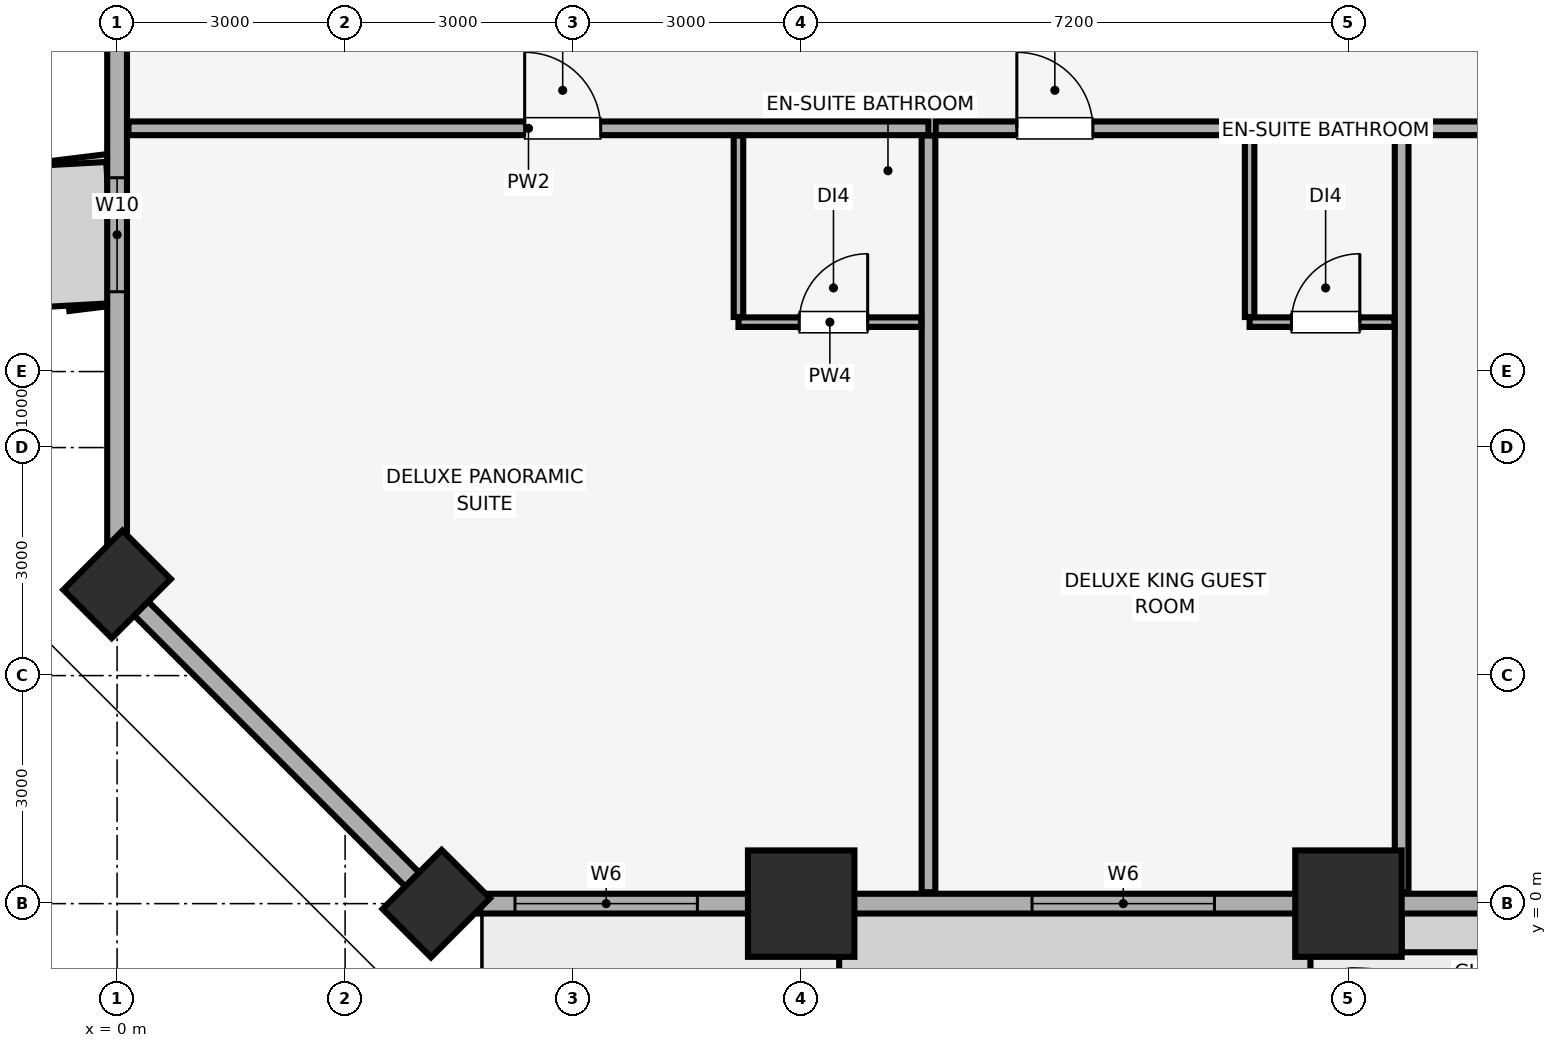
"""IFC4 building model, lengths in metres.
Left out: names, types, materials, properties, quantities, classifications, styles, units other than length and angle.
Written with IfcOpenShell. Run it as: python <this file> out.ifc"""

import sys

from ifc_helpers import new_model, si_unit, direction, frame, frame_2d, origin, origin_2d, place, context, subcontext, project, spatial, rectangle, extrude, element, fill, save


model = new_model("IFC4")
c1 = context("Model", 3, precision=1e-05, world=origin(), true_north=direction((0.0, 1.0)))
c2 = subcontext(c1, "Body", "Model", "MODEL_VIEW")
j1 = project(units=[si_unit("LENGTHUNIT", "METRE"), si_unit("PLANEANGLEUNIT", "RADIAN")], contexts=[c1])
p1 = place(None, origin())
s1 = spatial("IfcSite", under=j1, at=p1, CompositionType="ELEMENT")
p2 = place(p1, origin())
s2 = spatial("IfcBuilding", under=s1, at=p2, CompositionType="ELEMENT")
p3 = place(p2, frame((0.0, 0.0, 46.4)))
s3 = spatial("IfcBuildingStorey", under=s2, at=p3, CompositionType="ELEMENT", Elevation=46.4)
for number, where, z_axis, x_axis in (
    (1, (9.0, 0.0, 0.0), (0.0, 0.0, 1.0), (1.0, 0.0, 0.0)),
    (2, (16.2, 0.0, 0.0), (0.0, 0.0, 1.0), (1.0, 0.0, 0.0)),
):
    element("IfcColumn", number, at=place(p3, frame(where, z_axis=z_axis, x_axis=x_axis)), inside=s3, PredefinedType="COLUMN", context=c2, shape_type="SweptSolid", body=[
        extrude(rectangle(XDim=1.4, YDim=1.4, at=origin_2d()), origin(), (0.0, 0.0, 1.0), 3.51),
    ])
for number, where, z_axis, x_axis in (
    (3, (4.2, 0.0, 0.0), (0.0, 0.0, 1.0), (0.707, 0.707, 0.0)),
    (4, (0.0, 4.2, 0.0), (0.0, 0.0, 1.0), (0.707, 0.707, 0.0)),
):
    element("IfcColumn", number, at=place(p3, frame(where, z_axis=z_axis, x_axis=x_axis)), inside=s3, PredefinedType="PILASTER", context=c2, shape_type="SweptSolid", body=[
        extrude(rectangle(XDim=1.1, YDim=0.9, at=origin_2d()), origin(), (0.0, 0.0, 1.0), 3.51),
    ])
p4 = place(p3, frame((4.2, 0.0, 0.0), z_axis=(0.0, 0.0, 1.0), x_axis=(1.0, 0.0, 0.0)))
e5 = element("IfcWall", 5, at=p4, inside=s3, PredefinedType="SOLIDWALL", context=c2, shape_type="SweptSolid", body=[
    extrude(rectangle(XDim=75.6, YDim=0.26, at=frame_2d((37.8, 0.0))), origin(), (0.0, 0.0, 1.0), 2.56),
])
p5 = place(p4, frame((22.948, 0.0, 0.0)))
e6 = element("IfcOpeningElement", 6, at=p5, cuts=e5, PredefinedType="OPENING", context=c2, shape_type="SweptSolid", body=[
    extrude(rectangle(XDim=1.1, YDim=2.15, at=frame_2d((0.55, 1.075))), frame((0.0, 0.14, 0.0), z_axis=(0.0, -1.0, 0.0), x_axis=(1.0, 0.0, 0.0)), (0.0, 0.0, 1.0), 0.28),
])
p6 = place(p4, frame((44.61, 0.0, 0.0)))
e7 = element("IfcOpeningElement", 7, at=p6, cuts=e5, PredefinedType="OPENING", context=c2, shape_type="SweptSolid", body=[
    extrude(rectangle(XDim=1.1, YDim=2.15, at=frame_2d((0.55, 1.075))), frame((0.0, 0.14, 0.0), z_axis=(0.0, -1.0, 0.0), x_axis=(1.0, 0.0, 0.0)), (0.0, 0.0, 1.0), 0.28),
])
p7 = place(p4, frame((66.272, 0.0, 0.0)))
e8 = element("IfcOpeningElement", 8, at=p7, cuts=e5, PredefinedType="OPENING", context=c2, shape_type="SweptSolid", body=[
    extrude(rectangle(XDim=1.1, YDim=2.15, at=frame_2d((0.55, 1.075))), frame((0.0, 0.14, 0.0), z_axis=(0.0, -1.0, 0.0), x_axis=(1.0, 0.0, 0.0)), (0.0, 0.0, 1.0), 0.28),
])
p8 = place(p4, frame((1.035, 0.0, 0.85)))
e9 = element("IfcOpeningElement", 9, at=p8, cuts=e5, PredefinedType="OPENING", context=c2, shape_type="SweptSolid", body=[
    extrude(rectangle(XDim=2.4, YDim=1.5, at=frame_2d((1.2, 0.75))), frame((0.0, 0.14, 0.0), z_axis=(0.0, -1.0, 0.0), x_axis=(1.0, 0.0, 0.0)), (0.0, 0.0, 1.0), 0.28),
])
p9 = place(p4, frame((7.837, 0.0, 0.85)))
e10 = element("IfcOpeningElement", 10, at=p9, cuts=e5, PredefinedType="OPENING", context=c2, shape_type="SweptSolid", body=[
    extrude(rectangle(XDim=2.4, YDim=1.5, at=frame_2d((1.2, 0.75))), frame((0.0, 0.14, 0.0), z_axis=(0.0, -1.0, 0.0), x_axis=(1.0, 0.0, 0.0)), (0.0, 0.0, 1.0), 0.28),
])
p10 = place(p4, frame((14.55, 0.0, 0.85)))
e11 = element("IfcOpeningElement", 11, at=p10, cuts=e5, PredefinedType="OPENING", context=c2, shape_type="SweptSolid", body=[
    extrude(rectangle(XDim=2.4, YDim=1.5, at=frame_2d((1.2, 0.75))), frame((0.0, 0.14, 0.0), z_axis=(0.0, -1.0, 0.0), x_axis=(1.0, 0.0, 0.0)), (0.0, 0.0, 1.0), 0.28),
])
p11 = place(p4, frame((20.439, 0.0, 0.85)))
e12 = element("IfcOpeningElement", 12, at=p11, cuts=e5, PredefinedType="OPENING", context=c2, shape_type="SweptSolid", body=[
    extrude(rectangle(XDim=1.5, YDim=1.4, at=frame_2d((0.75, 0.7))), frame((0.0, 0.14, 0.0), z_axis=(0.0, -1.0, 0.0), x_axis=(1.0, 0.0, 0.0)), (0.0, 0.0, 1.0), 0.28),
])
p12 = place(p4, frame((27.887, 0.0, 0.85)))
e13 = element("IfcOpeningElement", 13, at=p12, cuts=e5, PredefinedType="OPENING", context=c2, shape_type="SweptSolid", body=[
    extrude(rectangle(XDim=2.4, YDim=1.5, at=frame_2d((1.2, 0.75))), frame((0.0, 0.14, 0.0), z_axis=(0.0, -1.0, 0.0), x_axis=(1.0, 0.0, 0.0)), (0.0, 0.0, 1.0), 0.28),
])
p13 = place(p4, frame((34.6, 0.0, 0.85)))
e14 = element("IfcOpeningElement", 14, at=p13, cuts=e5, PredefinedType="OPENING", context=c2, shape_type="SweptSolid", body=[
    extrude(rectangle(XDim=2.4, YDim=1.5, at=frame_2d((1.2, 0.75))), frame((0.0, 0.14, 0.0), z_axis=(0.0, -1.0, 0.0), x_axis=(1.0, 0.0, 0.0)), (0.0, 0.0, 1.0), 0.28),
])
p14 = place(p4, frame((38.399, 0.0, 0.85)))
e15 = element("IfcOpeningElement", 15, at=p14, cuts=e5, PredefinedType="OPENING", context=c2, shape_type="SweptSolid", body=[
    extrude(rectangle(XDim=2.4, YDim=1.5, at=frame_2d((1.2, 0.75))), frame((0.0, 0.14, 0.0), z_axis=(0.0, -1.0, 0.0), x_axis=(1.0, 0.0, 0.0)), (0.0, 0.0, 1.0), 0.28),
])
p15 = place(p4, frame((46.59, 0.0, 0.85)))
e16 = element("IfcOpeningElement", 16, at=p15, cuts=e5, PredefinedType="OPENING", context=c2, shape_type="SweptSolid", body=[
    extrude(rectangle(XDim=1.5, YDim=1.4, at=frame_2d((0.75, 0.7))), frame((0.0, 0.14, 0.0), z_axis=(0.0, -1.0, 0.0), x_axis=(1.0, 0.0, 0.0)), (0.0, 0.0, 1.0), 0.28),
])
p16 = place(p4, frame((51.824, 0.0, 0.85)))
e17 = element("IfcOpeningElement", 17, at=p16, cuts=e5, PredefinedType="OPENING", context=c2, shape_type="SweptSolid", body=[
    extrude(rectangle(XDim=2.4, YDim=1.5, at=frame_2d((1.2, 0.75))), frame((0.0, 0.14, 0.0), z_axis=(0.0, -1.0, 0.0), x_axis=(1.0, 0.0, 0.0)), (0.0, 0.0, 1.0), 0.28),
])
p17 = place(p4, frame((58.449, 0.0, 0.85)))
e18 = element("IfcOpeningElement", 18, at=p17, cuts=e5, PredefinedType="OPENING", context=c2, shape_type="SweptSolid", body=[
    extrude(rectangle(XDim=2.4, YDim=1.5, at=frame_2d((1.2, 0.75))), frame((0.0, 0.14, 0.0), z_axis=(0.0, -1.0, 0.0), x_axis=(1.0, 0.0, 0.0)), (0.0, 0.0, 1.0), 0.28),
])
p18 = place(p4, frame((72.165, 0.0, 0.85)))
e19 = element("IfcOpeningElement", 19, at=p18, cuts=e5, PredefinedType="OPENING", context=c2, shape_type="SweptSolid", body=[
    extrude(rectangle(XDim=2.4, YDim=1.5, at=frame_2d((1.2, 0.75))), frame((0.0, 0.14, 0.0), z_axis=(0.0, -1.0, 0.0), x_axis=(1.0, 0.0, 0.0)), (0.0, 0.0, 1.0), 0.28),
])
p19 = place(p3, frame((0.0, 44.8, 0.0), z_axis=(0.0, 0.0, 1.0), x_axis=(0.0, -1.0, 0.0)))
e20 = element("IfcWall", 20, at=p19, inside=s3, PredefinedType="SOLIDWALL", context=c2, shape_type="SweptSolid", body=[
    extrude(rectangle(XDim=40.6, YDim=0.26, at=frame_2d((20.3, 0.0))), origin(), (0.0, 0.0, 1.0), 2.56),
])
p20 = place(p19, frame((35.25, 0.0, 0.85)))
e21 = element("IfcOpeningElement", 21, at=p20, cuts=e20, PredefinedType="OPENING", context=c2, shape_type="SweptSolid", body=[
    extrude(rectangle(XDim=1.5, YDim=1.4, at=frame_2d((0.75, 0.7))), frame((0.0, 0.14, 0.0), z_axis=(0.0, -1.0, 0.0), x_axis=(1.0, 0.0, 0.0)), (0.0, 0.0, 1.0), 0.28),
])
p21 = place(p19, frame((25.985, 0.0, 0.85)))
e22 = element("IfcOpeningElement", 22, at=p21, cuts=e20, PredefinedType="OPENING", context=c2, shape_type="SweptSolid", body=[
    extrude(rectangle(XDim=1.5, YDim=1.4, at=frame_2d((0.75, 0.7))), frame((0.0, 0.14, 0.0), z_axis=(0.0, -1.0, 0.0), x_axis=(1.0, 0.0, 0.0)), (0.0, 0.0, 1.0), 0.28),
])
p22 = place(p19, frame((19.185, 0.0, 0.85)))
e23 = element("IfcOpeningElement", 23, at=p22, cuts=e20, PredefinedType="OPENING", context=c2, shape_type="SweptSolid", body=[
    extrude(rectangle(XDim=1.5, YDim=1.4, at=frame_2d((0.75, 0.7))), frame((0.0, 0.14, 0.0), z_axis=(0.0, -1.0, 0.0), x_axis=(1.0, 0.0, 0.0)), (0.0, 0.0, 1.0), 0.28),
])
p23 = place(p19, frame((10.4, 0.0, 0.85)))
e24 = element("IfcOpeningElement", 24, at=p23, cuts=e20, PredefinedType="OPENING", context=c2, shape_type="SweptSolid", body=[
    extrude(rectangle(XDim=1.5, YDim=1.4, at=frame_2d((0.75, 0.7))), frame((0.0, 0.14, 0.0), z_axis=(0.0, -1.0, 0.0), x_axis=(1.0, 0.0, 0.0)), (0.0, 0.0, 1.0), 0.28),
])
p24 = place(p19, frame((1.735, 0.0, 0.85)))
e25 = element("IfcOpeningElement", 25, at=p24, cuts=e20, PredefinedType="OPENING", context=c2, shape_type="SweptSolid", body=[
    extrude(rectangle(XDim=1.5, YDim=1.4, at=frame_2d((0.75, 0.7))), frame((0.0, 0.14, 0.0), z_axis=(0.0, -1.0, 0.0), x_axis=(1.0, 0.0, 0.0)), (0.0, 0.0, 1.0), 0.28),
])
p25 = place(p3, frame((0.0, 4.2, 0.0), z_axis=(0.0, 0.0, 1.0), x_axis=(0.707106781187, -0.707106781187, 0.0)))
e26 = element("IfcWall", 26, at=p25, inside=s3, PredefinedType="SOLIDWALL", context=c2, shape_type="SweptSolid", body=[
    extrude(rectangle(XDim=5.94, YDim=0.26, at=frame_2d((2.97, 0.0))), origin(), (0.0, 0.0, 1.0), 2.56),
])
p26 = place(p3, frame((0.15, 10.2, 0.0), z_axis=(0.0, 0.0, 1.0), x_axis=(1.0, 0.0, 0.0)))
e27 = element("IfcWall", 27, at=p26, inside=s3, PredefinedType="PARTITIONING", context=c2, shape_type="SweptSolid", body=[
    extrude(rectangle(XDim=10.525, YDim=0.18, at=frame_2d((5.262, 0.0))), origin(), (0.0, 0.0, 1.0), 3.51),
])
p27 = place(p26, frame((5.212, 0.0, 0.0)))
e28 = element("IfcOpeningElement", 28, at=p27, cuts=e27, PredefinedType="OPENING", context=c2, shape_type="SweptSolid", body=[
    extrude(rectangle(XDim=1.0, YDim=2.15, at=frame_2d((0.5, 1.075))), frame((0.0, 0.1, 0.0), z_axis=(0.0, -1.0, 0.0), x_axis=(1.0, 0.0, 0.0)), (0.0, 0.0, 1.0), 0.2),
])
p28 = place(p3, frame((10.675, 0.15, 0.0), z_axis=(0.0, 0.0, 1.0), x_axis=(0.0, 1.0, 0.0)))
e29 = element("IfcWall", 29, at=p28, inside=s3, PredefinedType="PARTITIONING", context=c2, shape_type="SweptSolid", body=[
    extrude(rectangle(XDim=9.955, YDim=0.18, at=frame_2d((4.978, 0.0))), origin(), (0.0, 0.0, 1.0), 3.51),
])
p29 = place(p3, frame((8.175, 7.65, 0.0), z_axis=(0.0, 0.0, 1.0), x_axis=(1.0, 0.0, 0.0)))
e30 = element("IfcWall", 30, at=p29, inside=s3, PredefinedType="PARTITIONING", context=c2, shape_type="SweptSolid", body=[
    extrude(rectangle(XDim=2.405, YDim=0.125, at=frame_2d((1.203, 0.0))), origin(), (0.0, 0.0, 1.0), 3.51),
])
p30 = place(p29, frame((0.8, 0.0, 0.0)))
e31 = element("IfcOpeningElement", 31, at=p30, cuts=e30, PredefinedType="OPENING", context=c2, shape_type="SweptSolid", body=[
    extrude(rectangle(XDim=0.9, YDim=2.1, at=frame_2d((0.45, 1.05))), frame((0.0, 0.073, 0.0), z_axis=(0.0, -1.0, 0.0), x_axis=(1.0, 0.0, 0.0)), (0.0, 0.0, 1.0), 0.145),
])
p31 = place(p3, frame((8.175, 7.718, 0.0), z_axis=(0.0, 0.0, 1.0), x_axis=(0.0, 1.0, 0.0)))
e32 = element("IfcWall", 32, at=p31, inside=s3, PredefinedType="PARTITIONING", context=c2, shape_type="SweptSolid", body=[
    extrude(rectangle(XDim=2.387, YDim=0.125, at=frame_2d((1.194, 0.0))), origin(), (0.0, 0.0, 1.0), 3.51),
])
p32 = place(p3, frame((10.77, 10.2, 0.0), z_axis=(0.0, 0.0, 1.0), x_axis=(1.0, 0.0, 0.0)))
e33 = element("IfcWall", 33, at=p32, inside=s3, PredefinedType="PARTITIONING", context=c2, shape_type="SweptSolid", body=[
    extrude(rectangle(XDim=6.13, YDim=0.18, at=frame_2d((3.065, 0.0))), origin(), (0.0, 0.0, 1.0), 3.51),
])
p33 = place(p32, frame((1.067, 0.0, 0.0)))
e34 = element("IfcOpeningElement", 34, at=p33, cuts=e33, PredefinedType="OPENING", context=c2, shape_type="SweptSolid", body=[
    extrude(rectangle(XDim=1.0, YDim=2.15, at=frame_2d((0.5, 1.075))), frame((0.0, 0.1, 0.0), z_axis=(0.0, -1.0, 0.0), x_axis=(1.0, 0.0, 0.0)), (0.0, 0.0, 1.0), 0.2),
])
p34 = place(p3, frame((16.9, 0.15, 0.0), z_axis=(0.0, 0.0, 1.0), x_axis=(0.0, 1.0, 0.0)))
e35 = element("IfcWall", 35, at=p34, inside=s3, PredefinedType="PARTITIONING", context=c2, shape_type="SweptSolid", body=[
    extrude(rectangle(XDim=9.955, YDim=0.18, at=frame_2d((4.978, 0.0))), origin(), (0.0, 0.0, 1.0), 3.51),
])
p35 = place(p3, frame((14.9, 7.65, 0.0), z_axis=(0.0, 0.0, 1.0), x_axis=(1.0, 0.0, 0.0)))
e36 = element("IfcWall", 36, at=p35, inside=s3, PredefinedType="PARTITIONING", context=c2, shape_type="SweptSolid", body=[
    extrude(rectangle(XDim=1.905, YDim=0.125, at=frame_2d((0.953, 0.0))), origin(), (0.0, 0.0, 1.0), 3.51),
])
p36 = place(p35, frame((0.55, 0.0, 0.0)))
e37 = element("IfcOpeningElement", 37, at=p36, cuts=e36, PredefinedType="OPENING", context=c2, shape_type="SweptSolid", body=[
    extrude(rectangle(XDim=0.9, YDim=2.1, at=frame_2d((0.45, 1.05))), frame((0.0, 0.073, 0.0), z_axis=(0.0, -1.0, 0.0), x_axis=(1.0, 0.0, 0.0)), (0.0, 0.0, 1.0), 0.145),
])
p37 = place(p3, frame((14.9, 7.718, 0.0), z_axis=(0.0, 0.0, 1.0), x_axis=(0.0, 1.0, 0.0)))
e38 = element("IfcWall", 38, at=p37, inside=s3, PredefinedType="PARTITIONING", context=c2, shape_type="SweptSolid", body=[
    extrude(rectangle(XDim=2.387, YDim=0.125, at=frame_2d((1.194, 0.0))), origin(), (0.0, 0.0, 1.0), 3.51),
])
p38 = place(p3, frame((16.995, 10.2, 0.0), z_axis=(0.0, 0.0, 1.0), x_axis=(1.0, 0.0, 0.0)))
e39 = element("IfcWall", 39, at=p38, inside=s3, PredefinedType="PARTITIONING", context=c2, shape_type="SweptSolid", body=[
    extrude(rectangle(XDim=6.13, YDim=0.18, at=frame_2d((3.065, 0.0))), origin(), (0.0, 0.0, 1.0), 3.51),
])
p39 = place(p38, frame((1.108, 0.0, 0.0)))
e40 = element("IfcOpeningElement", 40, at=p39, cuts=e39, PredefinedType="OPENING", context=c2, shape_type="SweptSolid", body=[
    extrude(rectangle(XDim=1.0, YDim=2.15, at=frame_2d((0.5, 1.075))), frame((0.0, 0.1, 0.0), z_axis=(0.0, -1.0, 0.0), x_axis=(1.0, 0.0, 0.0)), (0.0, 0.0, 1.0), 0.2),
])
p40 = place(p8, origin())
e41 = element("IfcWindow", 41, at=p40, inside=s3, PartitioningType="SINGLE_PANEL", PredefinedType="WINDOW", context=c2, shape_type="SweptSolid", body=[
    extrude(rectangle(XDim=2.4, YDim=1.5, at=frame_2d((1.2, 0.75))), frame((0.0, 0.03, 0.0), z_axis=(0.0, -1.0, 0.0), x_axis=(1.0, 0.0, 0.0)), (0.0, 0.0, 1.0), 0.06),
])
fill(e9, e41)
p41 = place(p9, origin())
e42 = element("IfcWindow", 42, at=p41, inside=s3, PartitioningType="SINGLE_PANEL", PredefinedType="WINDOW", context=c2, shape_type="SweptSolid", body=[
    extrude(rectangle(XDim=2.4, YDim=1.5, at=frame_2d((1.2, 0.75))), frame((0.0, 0.03, 0.0), z_axis=(0.0, -1.0, 0.0), x_axis=(1.0, 0.0, 0.0)), (0.0, 0.0, 1.0), 0.06),
])
fill(e10, e42)
p42 = place(p20, origin())
e43 = element("IfcWindow", 43, at=p42, inside=s3, PartitioningType="SINGLE_PANEL", PredefinedType="WINDOW", context=c2, shape_type="SweptSolid", body=[
    extrude(rectangle(XDim=1.5, YDim=1.4, at=frame_2d((0.75, 0.7))), frame((0.0, 0.03, 0.0), z_axis=(0.0, -1.0, 0.0), x_axis=(1.0, 0.0, 0.0)), (0.0, 0.0, 1.0), 0.06),
])
fill(e21, e43)
p43 = place(p27, origin())
e44 = element("IfcDoor", 44, at=p43, inside=s3, OperationType="SINGLE_SWING_LEFT", PredefinedType="DOOR", context=c2, shape_type="SweptSolid", body=[
    extrude(rectangle(XDim=1.0, YDim=2.15, at=frame_2d((0.5, 1.075))), frame((0.0, 0.025, 0.0), z_axis=(0.0, -1.0, 0.0), x_axis=(1.0, 0.0, 0.0)), (0.0, 0.0, 1.0), 0.05),
])
fill(e28, e44)
p44 = place(p30, origin())
e45 = element("IfcDoor", 45, at=p44, inside=s3, OperationType="SINGLE_SWING_RIGHT", PredefinedType="DOOR", context=c2, shape_type="SweptSolid", body=[
    extrude(rectangle(XDim=0.9, YDim=2.1, at=frame_2d((0.45, 1.05))), frame((0.0, 0.025, 0.0), z_axis=(0.0, -1.0, 0.0), x_axis=(1.0, 0.0, 0.0)), (0.0, 0.0, 1.0), 0.05),
])
fill(e31, e45)
p45 = place(p33, origin())
e46 = element("IfcDoor", 46, at=p45, inside=s3, OperationType="SINGLE_SWING_LEFT", PredefinedType="DOOR", context=c2, shape_type="SweptSolid", body=[
    extrude(rectangle(XDim=1.0, YDim=2.15, at=frame_2d((0.5, 1.075))), frame((0.0, 0.025, 0.0), z_axis=(0.0, -1.0, 0.0), x_axis=(1.0, 0.0, 0.0)), (0.0, 0.0, 1.0), 0.05),
])
fill(e34, e46)
p46 = place(p36, origin())
e47 = element("IfcDoor", 47, at=p46, inside=s3, OperationType="SINGLE_SWING_RIGHT", PredefinedType="DOOR", context=c2, shape_type="SweptSolid", body=[
    extrude(rectangle(XDim=0.9, YDim=2.1, at=frame_2d((0.45, 1.05))), frame((0.0, 0.025, 0.0), z_axis=(0.0, -1.0, 0.0), x_axis=(1.0, 0.0, 0.0)), (0.0, 0.0, 1.0), 0.05),
])
fill(e37, e47)
save(model, sys.argv[1])
